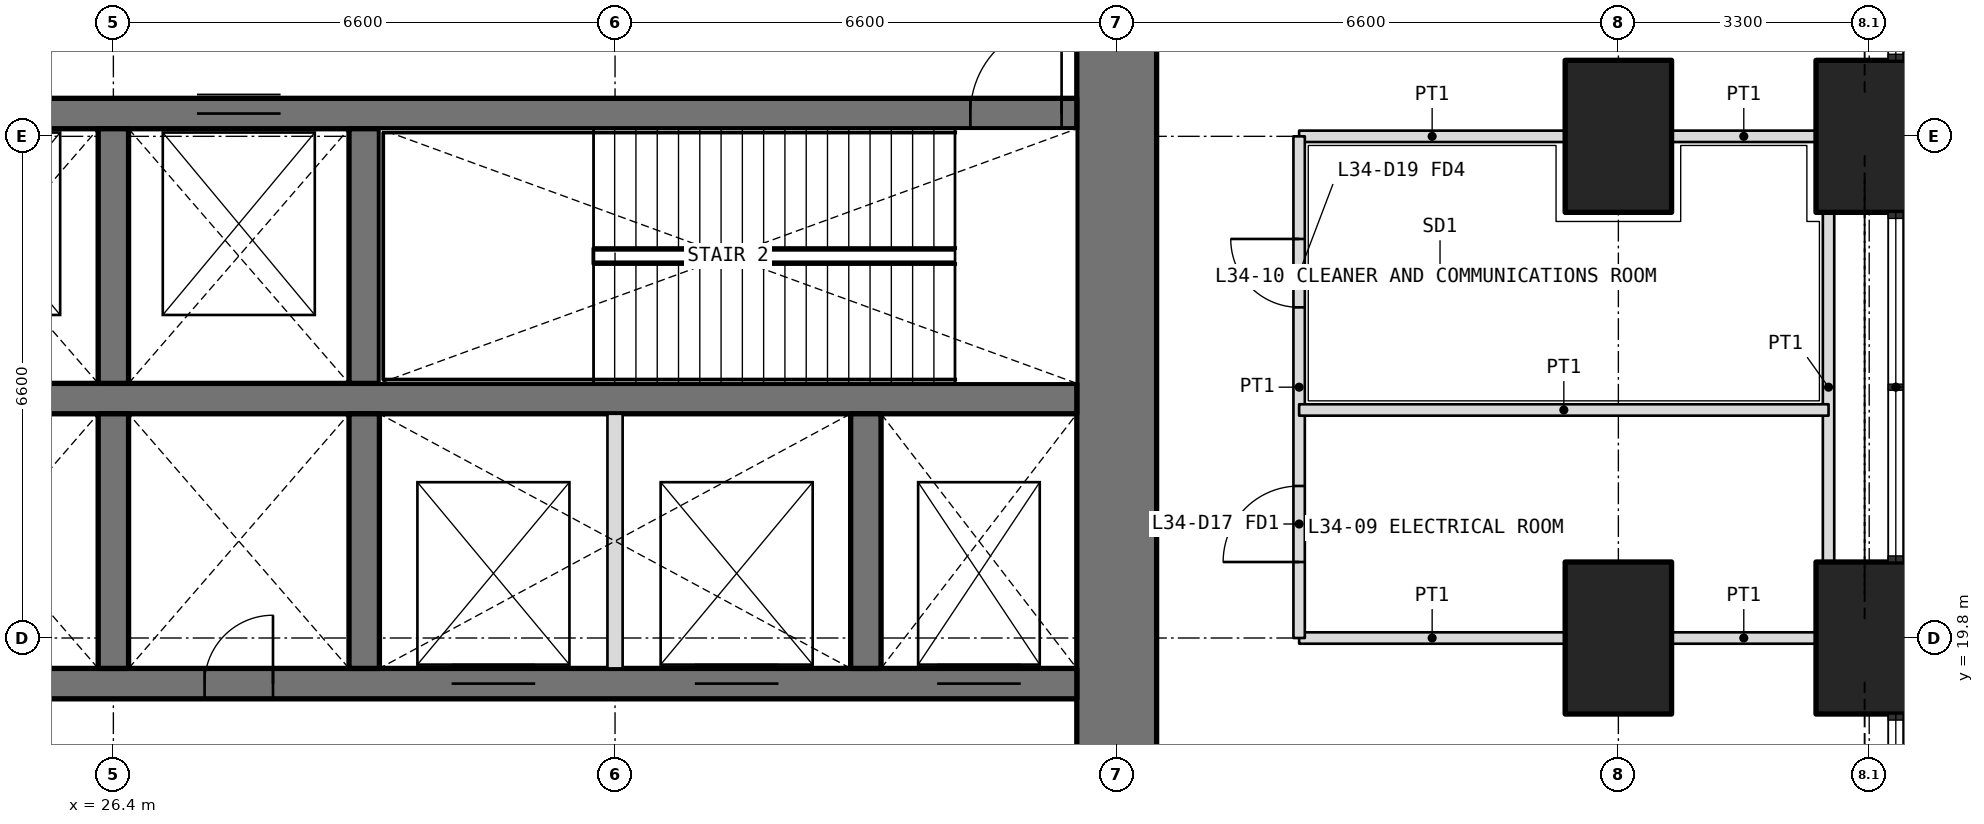
"""IFC4 building model, lengths in metres.
Left out: names, types, materials, properties, quantities, classifications, styles, units other than length and angle.
Written with IfcOpenShell. Run it as: python <this file> out.ifc"""

import sys

from ifc_helpers import new_model, si_unit, direction, frame, frame_2d, origin, origin_2d, place, context, subcontext, project, spatial, rectangle, extrude, element, fill, save


model = new_model("IFC4")
c1 = context("Model", 3, precision=1e-05, world=origin(), true_north=direction((0.0, 1.0)))
c2 = subcontext(c1, "Body", "Model", "MODEL_VIEW")
j1 = project(units=[si_unit("LENGTHUNIT", "METRE"), si_unit("PLANEANGLEUNIT", "RADIAN")], contexts=[c1])
p1 = place(None, origin())
s1 = spatial("IfcSite", under=j1, at=p1, CompositionType="ELEMENT")
p2 = place(p1, origin())
s2 = spatial("IfcBuilding", under=s1, at=p2, CompositionType="ELEMENT")
p3 = place(p2, frame((0.0, 0.0, 149.4)))
s3 = spatial("IfcBuildingStorey", under=s2, at=p3, CompositionType="ELEMENT", Elevation=149.4)
for number, where, z_axis, x_axis in (
    (1, (49.5, 19.8, 0.0), (0.0, 0.0, 1.0), (0.0, 1.0, 0.0)),
    (2, (49.5, 26.4, 0.0), (0.0, 0.0, 1.0), (0.0, 1.0, 0.0)),
    (3, (46.2, 19.8, 0.0), (0.0, 0.0, 1.0), (0.0, 1.0, 0.0)),
    (4, (46.2, 26.4, 0.0), (0.0, 0.0, 1.0), (0.0, 1.0, 0.0)),
):
    element("IfcColumn", number, at=place(p3, frame(where, z_axis=z_axis, x_axis=x_axis)), inside=s3, PredefinedType="COLUMN", context=c2, shape_type="SweptSolid", body=[
        extrude(rectangle(XDim=2.0, YDim=1.4, at=origin_2d()), origin(), (0.0, 0.0, 1.0), 6.3),
    ])
p4 = place(p3, frame((39.6, 13.725, 0.0), z_axis=(0.0, 0.0, 1.0), x_axis=(0.0, 1.0, 0.0)))
e5 = element("IfcWall", 5, at=p4, inside=s3, PredefinedType="SHEAR", context=c2, shape_type="SweptSolid", body=[
    extrude(rectangle(XDim=18.75, YDim=1.05, at=frame_2d((9.375, 0.0))), origin(), (0.0, 0.0, 1.0), 6.3),
])
p5 = place(p4, frame((3.025, 0.0, 0.0)))
e6 = element("IfcOpeningElement", 6, at=p5, cuts=e5, PredefinedType="OPENING", context=c2, shape_type="SweptSolid", body=[
    extrude(rectangle(XDim=1.6, YDim=2.1, at=frame_2d((0.8, 1.05))), frame((0.0, 0.535, 0.0), z_axis=(0.0, -1.0, 0.0), x_axis=(1.0, 0.0, 0.0)), (0.0, 0.0, 1.0), 1.07),
])
p6 = place(p4, frame((13.825, 0.0, 0.0)))
e7 = element("IfcOpeningElement", 7, at=p6, cuts=e5, PredefinedType="OPENING", context=c2, shape_type="SweptSolid", body=[
    extrude(rectangle(XDim=1.6, YDim=2.1, at=frame_2d((0.8, 1.05))), frame((0.0, 0.535, 0.0), z_axis=(0.0, -1.0, 0.0), x_axis=(1.0, 0.0, 0.0)), (0.0, 0.0, 1.0), 1.07),
])
p7 = place(p3, frame((13.725, 19.2, 0.0), z_axis=(0.0, 0.0, 1.0), x_axis=(1.0, 0.0, 0.0)))
e8 = element("IfcWall", 8, at=p7, inside=s3, PredefinedType="SHEAR", context=c2, shape_type="SweptSolid", body=[
    extrude(rectangle(XDim=25.35, YDim=0.4, at=frame_2d((12.675, 0.0))), origin(), (0.0, 0.0, 1.0), 6.3),
])
p8 = place(p7, frame((10.575, 0.0, 0.0)))
e9 = element("IfcOpeningElement", 9, at=p8, cuts=e8, PredefinedType="OPENING", context=c2, shape_type="SweptSolid", body=[
    extrude(rectangle(XDim=0.9, YDim=2.1, at=frame_2d((0.45, 1.05))), frame((0.0, 0.21, 0.0), z_axis=(0.0, -1.0, 0.0), x_axis=(1.0, 0.0, 0.0)), (0.0, 0.0, 1.0), 0.42),
])
p9 = place(p7, frame((13.875, 0.0, 0.0)))
e10 = element("IfcOpeningElement", 10, at=p9, cuts=e8, PredefinedType="OPENING", context=c2, shape_type="SweptSolid", body=[
    extrude(rectangle(XDim=0.9, YDim=2.1, at=frame_2d((0.45, 1.05))), frame((0.0, 0.21, 0.0), z_axis=(0.0, -1.0, 0.0), x_axis=(1.0, 0.0, 0.0)), (0.0, 0.0, 1.0), 0.42),
])
p10 = place(p7, frame((0.2, 0.0, 0.0)))
e11 = element("IfcOpeningElement", 11, at=p10, cuts=e8, PredefinedType="OPENING", context=c2, shape_type="SweptSolid", body=[
    extrude(rectangle(XDim=1.2, YDim=2.1, at=frame_2d((0.6, 1.05))), frame((0.0, 0.21, 0.0), z_axis=(0.0, -1.0, 0.0), x_axis=(1.0, 0.0, 0.0)), (0.0, 0.0, 1.0), 0.42),
])
p11 = place(p7, frame((23.512, 0.0, 0.0)))
e12 = element("IfcOpeningElement", 12, at=p11, cuts=e8, PredefinedType="OPENING", context=c2, shape_type="SweptSolid", body=[
    extrude(rectangle(XDim=1.1, YDim=2.1, at=frame_2d((0.55, 1.05))), frame((0.0, 0.21, 0.0), z_axis=(0.0, -1.0, 0.0), x_axis=(1.0, 0.0, 0.0)), (0.0, 0.0, 1.0), 0.42),
])
p12 = place(p7, frame((17.125, 0.0, 0.0)))
e13 = element("IfcOpeningElement", 13, at=p12, cuts=e8, PredefinedType="OPENING", context=c2, shape_type="SweptSolid", body=[
    extrude(rectangle(XDim=1.1, YDim=2.1, at=frame_2d((0.55, 1.05))), frame((0.0, 0.21, 0.0), z_axis=(0.0, -1.0, 0.0), x_axis=(1.0, 0.0, 0.0)), (0.0, 0.0, 1.0), 0.42),
])
p13 = place(p7, frame((20.325, 0.0, 0.0)))
e14 = element("IfcOpeningElement", 14, at=p13, cuts=e8, PredefinedType="OPENING", context=c2, shape_type="SweptSolid", body=[
    extrude(rectangle(XDim=1.1, YDim=2.1, at=frame_2d((0.55, 1.05))), frame((0.0, 0.21, 0.0), z_axis=(0.0, -1.0, 0.0), x_axis=(1.0, 0.0, 0.0)), (0.0, 0.0, 1.0), 0.42),
])
p14 = place(p3, frame((13.725, 22.95, 0.0), z_axis=(0.0, 0.0, 1.0), x_axis=(1.0, 0.0, 0.0)))
e15 = element("IfcWall", 15, at=p14, inside=s3, PredefinedType="SHEAR", context=c2, shape_type="SweptSolid", body=[
    extrude(rectangle(XDim=25.35, YDim=0.4, at=frame_2d((12.675, 0.0))), origin(), (0.0, 0.0, 1.0), 6.3),
])
p15 = place(p3, frame((13.725, 26.7, 0.0), z_axis=(0.0, 0.0, 1.0), x_axis=(1.0, 0.0, 0.0)))
e16 = element("IfcWall", 16, at=p15, inside=s3, PredefinedType="SHEAR", context=c2, shape_type="SweptSolid", body=[
    extrude(rectangle(XDim=25.35, YDim=0.4, at=frame_2d((12.675, 0.0))), origin(), (0.0, 0.0, 1.0), 6.3),
])
p16 = place(p15, frame((23.95, 0.0, 0.0)))
e17 = element("IfcOpeningElement", 17, at=p16, cuts=e16, PredefinedType="OPENING", context=c2, shape_type="SweptSolid", body=[
    extrude(rectangle(XDim=1.2, YDim=2.1, at=frame_2d((0.6, 1.05))), frame((0.0, 0.21, 0.0), z_axis=(0.0, -1.0, 0.0), x_axis=(1.0, 0.0, 0.0)), (0.0, 0.0, 1.0), 0.42),
])
p17 = place(p15, frame((0.738, 0.0, 0.0)))
e18 = element("IfcOpeningElement", 18, at=p17, cuts=e16, PredefinedType="OPENING", context=c2, shape_type="SweptSolid", body=[
    extrude(rectangle(XDim=1.1, YDim=2.1, at=frame_2d((0.55, 1.05))), frame((0.0, 0.21, 0.0), z_axis=(0.0, -1.0, 0.0), x_axis=(1.0, 0.0, 0.0)), (0.0, 0.0, 1.0), 0.42),
])
p18 = place(p15, frame((3.925, 0.0, 0.0)))
e19 = element("IfcOpeningElement", 19, at=p18, cuts=e16, PredefinedType="OPENING", context=c2, shape_type="SweptSolid", body=[
    extrude(rectangle(XDim=1.1, YDim=2.1, at=frame_2d((0.55, 1.05))), frame((0.0, 0.21, 0.0), z_axis=(0.0, -1.0, 0.0), x_axis=(1.0, 0.0, 0.0)), (0.0, 0.0, 1.0), 0.42),
])
p19 = place(p15, frame((7.175, 0.0, 0.0)))
e20 = element("IfcOpeningElement", 20, at=p19, cuts=e16, PredefinedType="OPENING", context=c2, shape_type="SweptSolid", body=[
    extrude(rectangle(XDim=1.1, YDim=2.1, at=frame_2d((0.55, 1.05))), frame((0.0, 0.21, 0.0), z_axis=(0.0, -1.0, 0.0), x_axis=(1.0, 0.0, 0.0)), (0.0, 0.0, 1.0), 0.42),
])
p20 = place(p15, frame((10.425, 0.0, 0.0)))
e21 = element("IfcOpeningElement", 21, at=p20, cuts=e16, PredefinedType="OPENING", context=c2, shape_type="SweptSolid", body=[
    extrude(rectangle(XDim=1.1, YDim=2.1, at=frame_2d((0.55, 1.05))), frame((0.0, 0.21, 0.0), z_axis=(0.0, -1.0, 0.0), x_axis=(1.0, 0.0, 0.0)), (0.0, 0.0, 1.0), 0.42),
])
p21 = place(p15, frame((13.775, 0.0, 0.0)))
e22 = element("IfcOpeningElement", 22, at=p21, cuts=e16, PredefinedType="OPENING", context=c2, shape_type="SweptSolid", body=[
    extrude(rectangle(XDim=1.1, YDim=2.1, at=frame_2d((0.55, 1.05))), frame((0.0, 0.21, 0.0), z_axis=(0.0, -1.0, 0.0), x_axis=(1.0, 0.0, 0.0)), (0.0, 0.0, 1.0), 0.42),
])
for number, where, z_axis, x_axis in (
    (23, (26.4, 19.4, 0.0), (0.0, 0.0, 1.0), (0.0, 1.0, 0.0)),
    (24, (29.7, 19.4, 0.0), (0.0, 0.0, 1.0), (0.0, 1.0, 0.0)),
    (25, (36.3, 19.4, 0.0), (0.0, 0.0, 1.0), (0.0, 1.0, 0.0)),
    (26, (26.4, 23.15, 0.0), (0.0, 0.0, 1.0), (0.0, 1.0, 0.0)),
    (27, (29.7, 23.15, 0.0), (0.0, 0.0, 1.0), (0.0, 1.0, 0.0)),
):
    element("IfcWall", number, at=place(p3, frame(where, z_axis=z_axis, x_axis=x_axis)), inside=s3, PredefinedType="SHEAR", context=c2, shape_type="SweptSolid", body=[
        extrude(rectangle(XDim=3.35, YDim=0.4, at=frame_2d((1.675, 0.0))), origin(), (0.0, 0.0, 1.0), 6.3),
    ])
p22 = place(p3, frame((33.0, 19.4, 0.0), z_axis=(0.0, 0.0, 1.0), x_axis=(0.0, 1.0, 0.0)))
e28 = element("IfcWall", 28, at=p22, inside=s3, PredefinedType="PARTITIONING", context=c2, shape_type="SweptSolid", body=[
    extrude(rectangle(XDim=3.35, YDim=0.2, at=frame_2d((1.675, 0.0))), origin(), (0.0, 0.0, 1.0), 6.3),
])
p23 = place(p3, frame((48.8, 19.8, 0.0), z_axis=(0.0, 0.0, 1.0), x_axis=(-1.0, 0.0, 0.0)))
e29 = element("IfcWall", 29, at=p23, inside=s3, PredefinedType="PARTITIONING", context=c2, shape_type="SweptSolid", body=[
    extrude(rectangle(XDim=1.9, YDim=0.15, at=frame_2d((0.95, 0.0))), origin(), (0.0, 0.0, 1.0), 4.0),
])
for number, where, z_axis, x_axis in (
    (30, (45.5, 19.8, 0.0), (0.0, 0.0, 1.0), (-1.0, 0.0, 0.0)),
    (31, (42.0, 26.4, 0.0), (0.0, 0.0, 1.0), (1.0, 0.0, 0.0)),
):
    element("IfcWall", number, at=place(p3, frame(where, z_axis=z_axis, x_axis=x_axis)), inside=s3, PredefinedType="PARTITIONING", context=c2, shape_type="SweptSolid", body=[
        extrude(rectangle(XDim=3.5, YDim=0.15, at=frame_2d((1.75, 0.0))), origin(), (0.0, 0.0, 1.0), 4.0),
    ])
p24 = place(p3, frame((46.9, 26.4, 0.0), z_axis=(0.0, 0.0, 1.0), x_axis=(1.0, 0.0, 0.0)))
e32 = element("IfcWall", 32, at=p24, inside=s3, PredefinedType="PARTITIONING", context=c2, shape_type="SweptSolid", body=[
    extrude(rectangle(XDim=1.9, YDim=0.15, at=frame_2d((0.95, 0.0))), origin(), (0.0, 0.0, 1.0), 4.0),
])
p25 = place(p3, frame((42.0, 19.8, 0.0), z_axis=(0.0, 0.0, 1.0), x_axis=(0.0, 1.0, 0.0)))
e33 = element("IfcWall", 33, at=p25, inside=s3, PredefinedType="PARTITIONING", context=c2, shape_type="SweptSolid", body=[
    extrude(rectangle(XDim=6.6, YDim=0.15, at=frame_2d((3.3, 0.0))), origin(), (0.0, 0.0, 1.0), 4.0),
])
p26 = place(p25, frame((1.0, 0.0, 0.0)))
e34 = element("IfcOpeningElement", 34, at=p26, cuts=e33, PredefinedType="OPENING", context=c2, shape_type="SweptSolid", body=[
    extrude(rectangle(XDim=1.0, YDim=2.1, at=frame_2d((0.5, 1.05))), frame((0.0, 0.085, 0.0), z_axis=(0.0, -1.0, 0.0), x_axis=(1.0, 0.0, 0.0)), (0.0, 0.0, 1.0), 0.17),
])
p27 = place(p25, frame((4.35, 0.0, 0.0)))
e35 = element("IfcOpeningElement", 35, at=p27, cuts=e33, PredefinedType="OPENING", context=c2, shape_type="SweptSolid", body=[
    extrude(rectangle(XDim=0.9, YDim=2.1, at=frame_2d((0.45, 1.05))), frame((0.0, 0.085, 0.0), z_axis=(0.0, -1.0, 0.0), x_axis=(1.0, 0.0, 0.0)), (0.0, 0.0, 1.0), 0.17),
])
p28 = place(p3, frame((48.965, 25.4, 0.0), z_axis=(0.0, 0.0, 1.0), x_axis=(0.0, -1.0, 0.0)))
e36 = element("IfcWall", 36, at=p28, inside=s3, PredefinedType="PARTITIONING", context=c2, shape_type="SweptSolid", body=[
    extrude(rectangle(XDim=4.6, YDim=0.15, at=frame_2d((2.3, 0.0))), origin(), (0.0, 0.0, 1.0), 4.0),
])
p29 = place(p3, frame((42.0, 22.8, 0.0), z_axis=(0.0, 0.0, 1.0), x_axis=(1.0, 0.0, 0.0)))
e37 = element("IfcWall", 37, at=p29, inside=s3, PredefinedType="PARTITIONING", context=c2, shape_type="SweptSolid", body=[
    extrude(rectangle(XDim=6.965, YDim=0.15, at=frame_2d((3.482, 0.0))), origin(), (0.0, 0.0, 1.0), 4.0),
])
p30 = place(p26, origin())
e38 = element("IfcDoor", 38, at=p30, inside=s3, OperationType="SINGLE_SWING_LEFT", PredefinedType="DOOR", context=c2, shape_type="SweptSolid", body=[
    extrude(rectangle(XDim=1.0, YDim=2.1, at=frame_2d((0.5, 1.05))), frame((0.0, 0.025, 0.0), z_axis=(0.0, -1.0, 0.0), x_axis=(1.0, 0.0, 0.0)), (0.0, 0.0, 1.0), 0.05),
])
fill(e34, e38)
p31 = place(p27, origin())
e39 = element("IfcDoor", 39, at=p31, inside=s3, OperationType="SINGLE_SWING_RIGHT", PredefinedType="DOOR", context=c2, shape_type="SweptSolid", body=[
    extrude(rectangle(XDim=0.9, YDim=2.1, at=frame_2d((0.45, 1.05))), frame((0.0, 0.025, 0.0), z_axis=(0.0, -1.0, 0.0), x_axis=(1.0, 0.0, 0.0)), (0.0, 0.0, 1.0), 0.05),
])
fill(e35, e39)
p32 = place(p9, origin())
e40 = element("IfcDoor", 40, at=p32, inside=s3, OperationType="SINGLE_SWING_RIGHT", PredefinedType="DOOR", context=c2, shape_type="SweptSolid", body=[
    extrude(rectangle(XDim=0.9, YDim=2.1, at=frame_2d((0.45, 1.05))), frame((0.0, 0.025, 0.0), z_axis=(0.0, -1.0, 0.0), x_axis=(1.0, 0.0, 0.0)), (0.0, 0.0, 1.0), 0.05),
])
fill(e10, e40)
p33 = place(p16, origin())
e41 = element("IfcDoor", 41, at=p33, inside=s3, OperationType="SINGLE_SWING_RIGHT", PredefinedType="DOOR", context=c2, shape_type="SweptSolid", body=[
    extrude(rectangle(XDim=1.2, YDim=2.1, at=frame_2d((0.6, 1.05))), frame((0.0, 0.025, 0.0), z_axis=(0.0, -1.0, 0.0), x_axis=(1.0, 0.0, 0.0)), (0.0, 0.0, 1.0), 0.05),
])
fill(e17, e41)
p34 = place(p11, origin())
e42 = element("IfcDoor", 42, at=p34, inside=s3, OperationType="DOUBLE_DOOR_SLIDING", PredefinedType="DOOR", context=c2, shape_type="SweptSolid", body=[
    extrude(rectangle(XDim=1.1, YDim=2.1, at=frame_2d((0.55, 1.05))), frame((0.0, 0.025, 0.0), z_axis=(0.0, -1.0, 0.0), x_axis=(1.0, 0.0, 0.0)), (0.0, 0.0, 1.0), 0.05),
])
fill(e12, e42)
p35 = place(p12, origin())
e43 = element("IfcDoor", 43, at=p35, inside=s3, OperationType="DOUBLE_DOOR_SLIDING", PredefinedType="DOOR", context=c2, shape_type="SweptSolid", body=[
    extrude(rectangle(XDim=1.1, YDim=2.1, at=frame_2d((0.55, 1.05))), frame((0.0, 0.025, 0.0), z_axis=(0.0, -1.0, 0.0), x_axis=(1.0, 0.0, 0.0)), (0.0, 0.0, 1.0), 0.05),
])
fill(e13, e43)
p36 = place(p13, origin())
e44 = element("IfcDoor", 44, at=p36, inside=s3, OperationType="DOUBLE_DOOR_SLIDING", PredefinedType="DOOR", context=c2, shape_type="SweptSolid", body=[
    extrude(rectangle(XDim=1.1, YDim=2.1, at=frame_2d((0.55, 1.05))), frame((0.0, 0.025, 0.0), z_axis=(0.0, -1.0, 0.0), x_axis=(1.0, 0.0, 0.0)), (0.0, 0.0, 1.0), 0.05),
])
fill(e14, e44)
p37 = place(p21, origin())
e45 = element("IfcDoor", 45, at=p37, inside=s3, OperationType="DOUBLE_DOOR_SLIDING", PredefinedType="DOOR", context=c2, shape_type="SweptSolid", body=[
    extrude(rectangle(XDim=1.1, YDim=2.1, at=frame_2d((0.55, 1.05))), frame((0.0, 0.025, 0.0), z_axis=(0.0, -1.0, 0.0), x_axis=(1.0, 0.0, 0.0)), (0.0, 0.0, 1.0), 0.05),
])
fill(e22, e45)
save(model, sys.argv[1])
